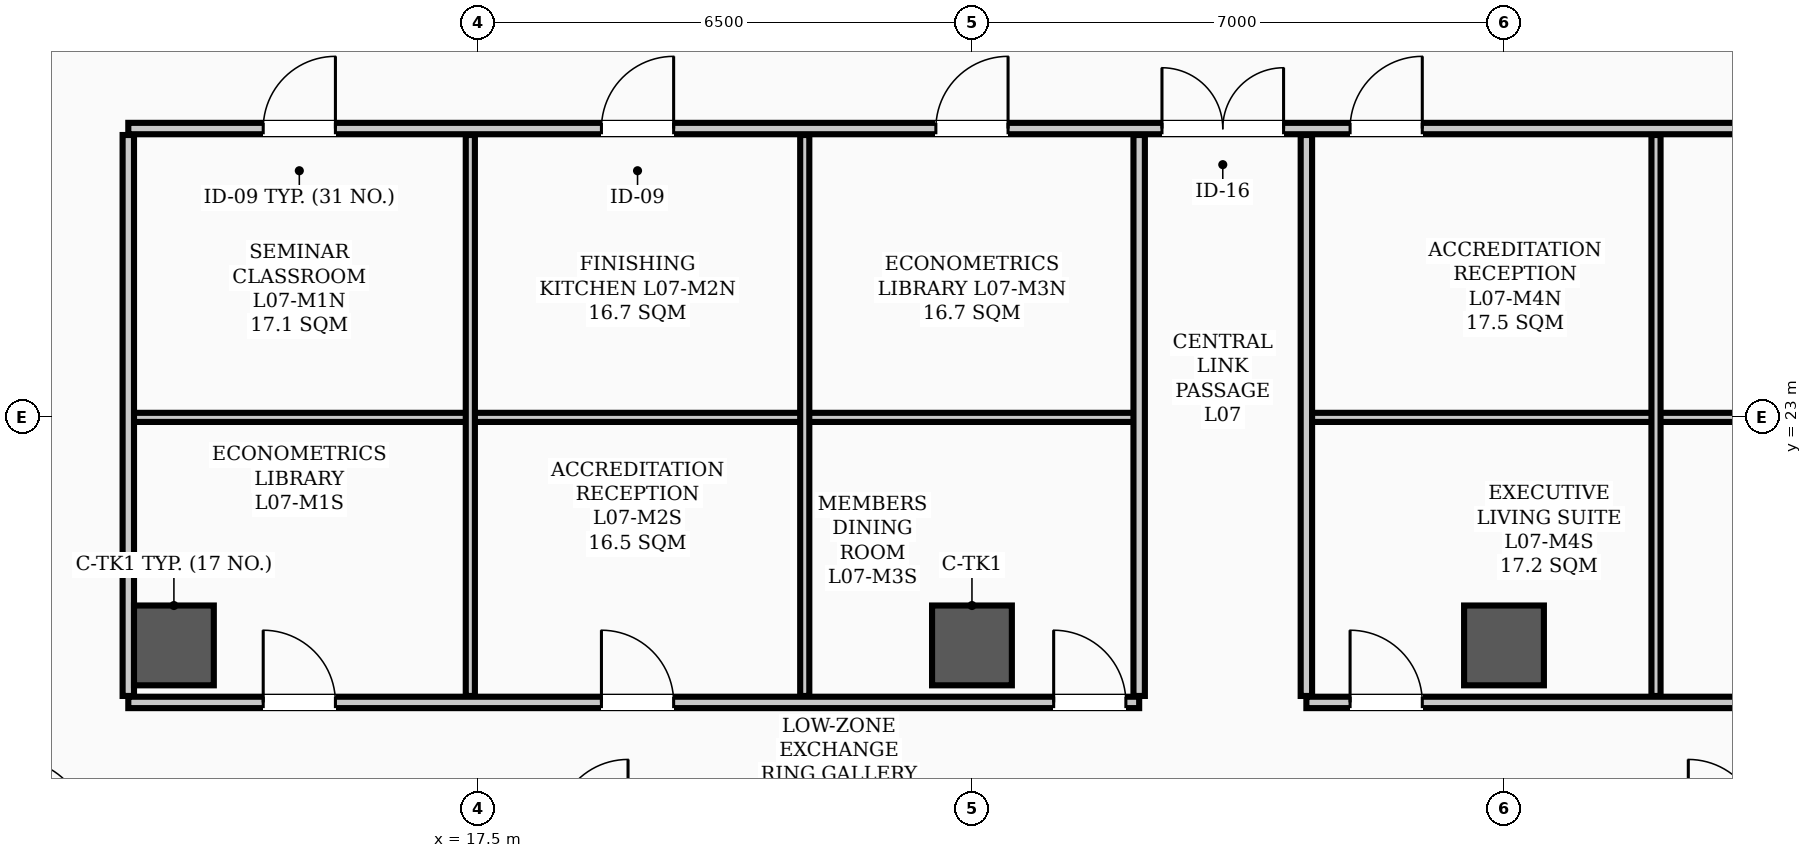
"""IFC4 building model, lengths in metres.
Left out: names, types, materials, properties, quantities, classifications, styles, units other than length and angle.
Written with IfcOpenShell. Run it as: python <this file> out.ifc"""

import sys

from ifc_helpers import new_model, si_unit, direction, frame, frame_2d, origin, origin_2d, place, context, subcontext, project, spatial, rectangle, hollow_rectangle, extrude, element, fill, save


model = new_model("IFC4")
c1 = context("Model", 3, precision=1e-05, world=origin(), true_north=direction((0.0, 1.0)))
c2 = subcontext(c1, "Body", "Model", "MODEL_VIEW")
j1 = project(units=[si_unit("LENGTHUNIT", "METRE"), si_unit("PLANEANGLEUNIT", "RADIAN")], contexts=[c1])
p1 = place(None, origin())
s1 = spatial("IfcSite", under=j1, at=p1, CompositionType="ELEMENT")
p2 = place(p1, origin())
s2 = spatial("IfcBuilding", under=s1, at=p2, CompositionType="ELEMENT")
p3 = place(p2, frame((0.0, 0.0, 30.4)))
s3 = spatial("IfcBuildingStorey", under=s2, at=p3, CompositionType="ELEMENT", Elevation=30.4)
for number, where, z_axis, x_axis in (
    (1, (13.5, 20.0, 0.0), (0.0, 0.0, 1.0), (1.0, 0.0, 0.0)),
    (2, (24.0, 20.0, 0.0), (0.0, 0.0, 1.0), (1.0, 0.0, 0.0)),
    (3, (31.0, 20.0, 0.0), (0.0, 0.0, 1.0), (1.0, 0.0, 0.0)),
):
    element("IfcColumn", number, at=place(p3, frame(where, z_axis=z_axis, x_axis=x_axis)), inside=s3, PredefinedType="COLUMN", context=c2, shape_type="SweptSolid", body=[
        extrude(hollow_rectangle(XDim=1.05, YDim=1.05, WallThickness=0.038, InnerFilletRadius=0.019, OuterFilletRadius=0.057, at=origin_2d()), origin(), (0.0, 0.0, 1.0), 3.9),
    ])
p4 = place(p3, frame((12.9, 26.8, 0.0), z_axis=(0.0, 0.0, 1.0), x_axis=(1.0, 0.0, 0.0)))
e4 = element("IfcWall", 4, at=p4, inside=s3, PredefinedType="PARTITIONING", context=c2, shape_type="SweptSolid", body=[
    extrude(rectangle(XDim=31.7, YDim=0.15, at=frame_2d((15.85, 0.0))), origin(), (0.0, 0.0, 1.0), 3.1),
])
p5 = place(p4, frame((13.6, 0.0, 0.0)))
e5 = element("IfcOpeningElement", 5, at=p5, cuts=e4, PredefinedType="OPENING", context=c2, shape_type="SweptSolid", body=[
    extrude(rectangle(XDim=1.6, YDim=2.08, at=frame_2d((0.8, 1.04))), frame((0.0, 0.085, 0.0), z_axis=(0.0, -1.0, 0.0), x_axis=(1.0, 0.0, 0.0)), (0.0, 0.0, 1.0), 0.17),
])
p6 = place(p4, frame((1.775, 0.0, 0.0)))
e6 = element("IfcOpeningElement", 6, at=p6, cuts=e4, PredefinedType="OPENING", context=c2, shape_type="SweptSolid", body=[
    extrude(rectangle(XDim=0.95, YDim=2.08, at=frame_2d((0.475, 1.04))), frame((0.0, 0.085, 0.0), z_axis=(0.0, -1.0, 0.0), x_axis=(1.0, 0.0, 0.0)), (0.0, 0.0, 1.0), 0.17),
])
p7 = place(p4, frame((6.225, 0.0, 0.0)))
e7 = element("IfcOpeningElement", 7, at=p7, cuts=e4, PredefinedType="OPENING", context=c2, shape_type="SweptSolid", body=[
    extrude(rectangle(XDim=0.95, YDim=2.08, at=frame_2d((0.475, 1.04))), frame((0.0, 0.085, 0.0), z_axis=(0.0, -1.0, 0.0), x_axis=(1.0, 0.0, 0.0)), (0.0, 0.0, 1.0), 0.17),
])
p8 = place(p4, frame((10.625, 0.0, 0.0)))
e8 = element("IfcOpeningElement", 8, at=p8, cuts=e4, PredefinedType="OPENING", context=c2, shape_type="SweptSolid", body=[
    extrude(rectangle(XDim=0.95, YDim=2.08, at=frame_2d((0.475, 1.04))), frame((0.0, 0.085, 0.0), z_axis=(0.0, -1.0, 0.0), x_axis=(1.0, 0.0, 0.0)), (0.0, 0.0, 1.0), 0.17),
])
p9 = place(p4, frame((16.075, 0.0, 0.0)))
e9 = element("IfcOpeningElement", 9, at=p9, cuts=e4, PredefinedType="OPENING", context=c2, shape_type="SweptSolid", body=[
    extrude(rectangle(XDim=0.95, YDim=2.08, at=frame_2d((0.475, 1.04))), frame((0.0, 0.085, 0.0), z_axis=(0.0, -1.0, 0.0), x_axis=(1.0, 0.0, 0.0)), (0.0, 0.0, 1.0), 0.17),
])
p10 = place(p4, frame((21.925, 0.0, 0.0)))
e10 = element("IfcOpeningElement", 10, at=p10, cuts=e4, PredefinedType="OPENING", context=c2, shape_type="SweptSolid", body=[
    extrude(rectangle(XDim=0.95, YDim=2.08, at=frame_2d((0.475, 1.04))), frame((0.0, 0.085, 0.0), z_axis=(0.0, -1.0, 0.0), x_axis=(1.0, 0.0, 0.0)), (0.0, 0.0, 1.0), 0.17),
])
p11 = place(p4, frame((28.625, 0.0, 0.0)))
e11 = element("IfcOpeningElement", 11, at=p11, cuts=e4, PredefinedType="OPENING", context=c2, shape_type="SweptSolid", body=[
    extrude(rectangle(XDim=0.95, YDim=2.08, at=frame_2d((0.475, 1.04))), frame((0.0, 0.085, 0.0), z_axis=(0.0, -1.0, 0.0), x_axis=(1.0, 0.0, 0.0)), (0.0, 0.0, 1.0), 0.17),
])
p12 = place(p3, frame((12.9, 19.25, 0.0), z_axis=(0.0, 0.0, 1.0), x_axis=(1.0, 0.0, 0.0)))
e12 = element("IfcWall", 12, at=p12, inside=s3, PredefinedType="PARTITIONING", context=c2, shape_type="SweptSolid", body=[
    extrude(rectangle(XDim=13.3, YDim=0.15, at=frame_2d((6.65, 0.0))), origin(), (0.0, 0.0, 1.0), 3.1),
])
p13 = place(p12, frame((1.775, 0.0, 0.0)))
e13 = element("IfcOpeningElement", 13, at=p13, cuts=e12, PredefinedType="OPENING", context=c2, shape_type="SweptSolid", body=[
    extrude(rectangle(XDim=0.95, YDim=2.08, at=frame_2d((0.475, 1.04))), frame((0.0, 0.085, 0.0), z_axis=(0.0, -1.0, 0.0), x_axis=(1.0, 0.0, 0.0)), (0.0, 0.0, 1.0), 0.17),
])
p14 = place(p12, frame((6.225, 0.0, 0.0)))
e14 = element("IfcOpeningElement", 14, at=p14, cuts=e12, PredefinedType="OPENING", context=c2, shape_type="SweptSolid", body=[
    extrude(rectangle(XDim=0.95, YDim=2.08, at=frame_2d((0.475, 1.04))), frame((0.0, 0.085, 0.0), z_axis=(0.0, -1.0, 0.0), x_axis=(1.0, 0.0, 0.0)), (0.0, 0.0, 1.0), 0.17),
])
p15 = place(p12, frame((12.175, 0.0, 0.0)))
e15 = element("IfcOpeningElement", 15, at=p15, cuts=e12, PredefinedType="OPENING", context=c2, shape_type="SweptSolid", body=[
    extrude(rectangle(XDim=0.95, YDim=2.08, at=frame_2d((0.475, 1.04))), frame((0.0, 0.085, 0.0), z_axis=(0.0, -1.0, 0.0), x_axis=(1.0, 0.0, 0.0)), (0.0, 0.0, 1.0), 0.17),
])
p16 = place(p3, frame((28.4, 19.25, 0.0), z_axis=(0.0, 0.0, 1.0), x_axis=(1.0, 0.0, 0.0)))
e16 = element("IfcWall", 16, at=p16, inside=s3, PredefinedType="PARTITIONING", context=c2, shape_type="SweptSolid", body=[
    extrude(rectangle(XDim=16.2, YDim=0.15, at=frame_2d((8.1, 0.0))), origin(), (0.0, 0.0, 1.0), 3.1),
])
p17 = place(p16, frame((0.575, 0.0, 0.0)))
e17 = element("IfcOpeningElement", 17, at=p17, cuts=e16, PredefinedType="OPENING", context=c2, shape_type="SweptSolid", body=[
    extrude(rectangle(XDim=0.95, YDim=2.08, at=frame_2d((0.475, 1.04))), frame((0.0, 0.085, 0.0), z_axis=(0.0, -1.0, 0.0), x_axis=(1.0, 0.0, 0.0)), (0.0, 0.0, 1.0), 0.17),
])
p18 = place(p16, frame((6.425, 0.0, 0.0)))
e18 = element("IfcOpeningElement", 18, at=p18, cuts=e16, PredefinedType="OPENING", context=c2, shape_type="SweptSolid", body=[
    extrude(rectangle(XDim=0.95, YDim=2.08, at=frame_2d((0.475, 1.04))), frame((0.0, 0.085, 0.0), z_axis=(0.0, -1.0, 0.0), x_axis=(1.0, 0.0, 0.0)), (0.0, 0.0, 1.0), 0.17),
])
p19 = place(p16, frame((13.125, 0.0, 0.0)))
e19 = element("IfcOpeningElement", 19, at=p19, cuts=e16, PredefinedType="OPENING", context=c2, shape_type="SweptSolid", body=[
    extrude(rectangle(XDim=0.95, YDim=2.08, at=frame_2d((0.475, 1.04))), frame((0.0, 0.085, 0.0), z_axis=(0.0, -1.0, 0.0), x_axis=(1.0, 0.0, 0.0)), (0.0, 0.0, 1.0), 0.17),
])
p20 = place(p3, frame((12.9, 23.0, 0.0), z_axis=(0.0, 0.0, 1.0), x_axis=(1.0, 0.0, 0.0)))
e20 = element("IfcWall", 20, at=p20, inside=s3, PredefinedType="PARTITIONING", context=c2, shape_type="SweptSolid", body=[
    extrude(rectangle(XDim=4.5, YDim=0.12, at=frame_2d((2.25, 0.0))), origin(), (0.0, 0.0, 1.0), 3.1),
])
p21 = place(p3, frame((17.4, 23.0, 0.0), z_axis=(0.0, 0.0, 1.0), x_axis=(1.0, 0.0, 0.0)))
e21 = element("IfcWall", 21, at=p21, inside=s3, PredefinedType="PARTITIONING", context=c2, shape_type="SweptSolid", body=[
    extrude(rectangle(XDim=4.4, YDim=0.12, at=frame_2d((2.2, 0.0))), origin(), (0.0, 0.0, 1.0), 3.3),
])
p22 = place(p3, frame((21.8, 23.0, 0.0), z_axis=(0.0, 0.0, 1.0), x_axis=(1.0, 0.0, 0.0)))
e22 = element("IfcWall", 22, at=p22, inside=s3, PredefinedType="PARTITIONING", context=c2, shape_type="SweptSolid", body=[
    extrude(rectangle(XDim=4.4, YDim=0.12, at=frame_2d((2.2, 0.0))), origin(), (0.0, 0.0, 1.0), 3.1),
])
p23 = place(p3, frame((28.4, 23.0, 0.0), z_axis=(0.0, 0.0, 1.0), x_axis=(1.0, 0.0, 0.0)))
e23 = element("IfcWall", 23, at=p23, inside=s3, PredefinedType="PARTITIONING", context=c2, shape_type="SweptSolid", body=[
    extrude(rectangle(XDim=4.6, YDim=0.12, at=frame_2d((2.3, 0.0))), origin(), (0.0, 0.0, 1.0), 3.1),
])
p24 = place(p3, frame((33.0, 23.0, 0.0), z_axis=(0.0, 0.0, 1.0), x_axis=(1.0, 0.0, 0.0)))
e24 = element("IfcWall", 24, at=p24, inside=s3, PredefinedType="PARTITIONING", context=c2, shape_type="SweptSolid", body=[
    extrude(rectangle(XDim=6.4, YDim=0.12, at=frame_2d((3.2, 0.0))), origin(), (0.0, 0.0, 1.0), 3.1),
])
for number, where, z_axis, x_axis in (
    (25, (26.2, 19.335, 0.0), (0.0, 0.0, 1.0), (0.0, 1.0, 0.0)),
    (26, (28.4, 19.335, 0.0), (0.0, 0.0, 1.0), (0.0, 1.0, 0.0)),
    (27, (12.9, 19.335, 0.0), (0.0, 0.0, 1.0), (0.0, 1.0, 0.0)),
):
    element("IfcWall", number, at=place(p3, frame(where, z_axis=z_axis, x_axis=x_axis)), inside=s3, PredefinedType="PARTITIONING", context=c2, shape_type="SweptSolid", body=[
        extrude(rectangle(XDim=7.38, YDim=0.15, at=frame_2d((3.69, 0.0))), origin(), (0.0, 0.0, 1.0), 3.0),
    ])
for number, where, z_axis, x_axis in (
    (28, (17.4, 19.335, 0.0), (0.0, 0.0, 1.0), (0.0, 1.0, 0.0)),
    (29, (21.8, 19.335, 0.0), (0.0, 0.0, 1.0), (0.0, 1.0, 0.0)),
    (30, (33.0, 19.335, 0.0), (0.0, 0.0, 1.0), (0.0, 1.0, 0.0)),
):
    element("IfcWall", number, at=place(p3, frame(where, z_axis=z_axis, x_axis=x_axis)), inside=s3, PredefinedType="PARTITIONING", context=c2, shape_type="SweptSolid", body=[
        extrude(rectangle(XDim=7.38, YDim=0.12, at=frame_2d((3.69, 0.0))), origin(), (0.0, 0.0, 1.0), 3.0),
    ])
p25 = place(p5, origin())
e31 = element("IfcDoor", 31, at=p25, inside=s3, OperationType="DOUBLE_DOOR_SINGLE_SWING", PredefinedType="DOOR", context=c2, shape_type="SweptSolid", body=[
    extrude(rectangle(XDim=1.6, YDim=2.08, at=frame_2d((0.8, 1.04))), frame((0.0, 0.025, 0.0), z_axis=(0.0, -1.0, 0.0), x_axis=(1.0, 0.0, 0.0)), (0.0, 0.0, 1.0), 0.05),
])
fill(e5, e31)
p26 = place(p6, origin())
e32 = element("IfcDoor", 32, at=p26, inside=s3, OperationType="SINGLE_SWING_RIGHT", PredefinedType="DOOR", context=c2, shape_type="SweptSolid", body=[
    extrude(rectangle(XDim=0.95, YDim=2.08, at=frame_2d((0.475, 1.04))), frame((0.0, 0.025, 0.0), z_axis=(0.0, -1.0, 0.0), x_axis=(1.0, 0.0, 0.0)), (0.0, 0.0, 1.0), 0.05),
])
fill(e6, e32)
p27 = place(p13, origin())
e33 = element("IfcDoor", 33, at=p27, inside=s3, OperationType="SINGLE_SWING_LEFT", PredefinedType="DOOR", context=c2, shape_type="SweptSolid", body=[
    extrude(rectangle(XDim=0.95, YDim=2.08, at=frame_2d((0.475, 1.04))), frame((0.0, 0.025, 0.0), z_axis=(0.0, -1.0, 0.0), x_axis=(1.0, 0.0, 0.0)), (0.0, 0.0, 1.0), 0.05),
])
fill(e13, e33)
p28 = place(p7, origin())
e34 = element("IfcDoor", 34, at=p28, inside=s3, OperationType="SINGLE_SWING_RIGHT", PredefinedType="DOOR", context=c2, shape_type="SweptSolid", body=[
    extrude(rectangle(XDim=0.95, YDim=2.08, at=frame_2d((0.475, 1.04))), frame((0.0, 0.025, 0.0), z_axis=(0.0, -1.0, 0.0), x_axis=(1.0, 0.0, 0.0)), (0.0, 0.0, 1.0), 0.05),
])
fill(e7, e34)
p29 = place(p14, origin())
e35 = element("IfcDoor", 35, at=p29, inside=s3, OperationType="SINGLE_SWING_LEFT", PredefinedType="DOOR", context=c2, shape_type="SweptSolid", body=[
    extrude(rectangle(XDim=0.95, YDim=2.08, at=frame_2d((0.475, 1.04))), frame((0.0, 0.025, 0.0), z_axis=(0.0, -1.0, 0.0), x_axis=(1.0, 0.0, 0.0)), (0.0, 0.0, 1.0), 0.05),
])
fill(e14, e35)
p30 = place(p8, origin())
e36 = element("IfcDoor", 36, at=p30, inside=s3, OperationType="SINGLE_SWING_RIGHT", PredefinedType="DOOR", context=c2, shape_type="SweptSolid", body=[
    extrude(rectangle(XDim=0.95, YDim=2.08, at=frame_2d((0.475, 1.04))), frame((0.0, 0.025, 0.0), z_axis=(0.0, -1.0, 0.0), x_axis=(1.0, 0.0, 0.0)), (0.0, 0.0, 1.0), 0.05),
])
fill(e8, e36)
p31 = place(p15, origin())
e37 = element("IfcDoor", 37, at=p31, inside=s3, OperationType="SINGLE_SWING_LEFT", PredefinedType="DOOR", context=c2, shape_type="SweptSolid", body=[
    extrude(rectangle(XDim=0.95, YDim=2.08, at=frame_2d((0.475, 1.04))), frame((0.0, 0.025, 0.0), z_axis=(0.0, -1.0, 0.0), x_axis=(1.0, 0.0, 0.0)), (0.0, 0.0, 1.0), 0.05),
])
fill(e15, e37)
p32 = place(p9, origin())
e38 = element("IfcDoor", 38, at=p32, inside=s3, OperationType="SINGLE_SWING_RIGHT", PredefinedType="DOOR", context=c2, shape_type="SweptSolid", body=[
    extrude(rectangle(XDim=0.95, YDim=2.08, at=frame_2d((0.475, 1.04))), frame((0.0, 0.025, 0.0), z_axis=(0.0, -1.0, 0.0), x_axis=(1.0, 0.0, 0.0)), (0.0, 0.0, 1.0), 0.05),
])
fill(e9, e38)
p33 = place(p17, origin())
e39 = element("IfcDoor", 39, at=p33, inside=s3, OperationType="SINGLE_SWING_LEFT", PredefinedType="DOOR", context=c2, shape_type="SweptSolid", body=[
    extrude(rectangle(XDim=0.95, YDim=2.08, at=frame_2d((0.475, 1.04))), frame((0.0, 0.025, 0.0), z_axis=(0.0, -1.0, 0.0), x_axis=(1.0, 0.0, 0.0)), (0.0, 0.0, 1.0), 0.05),
])
fill(e17, e39)
save(model, sys.argv[1])
